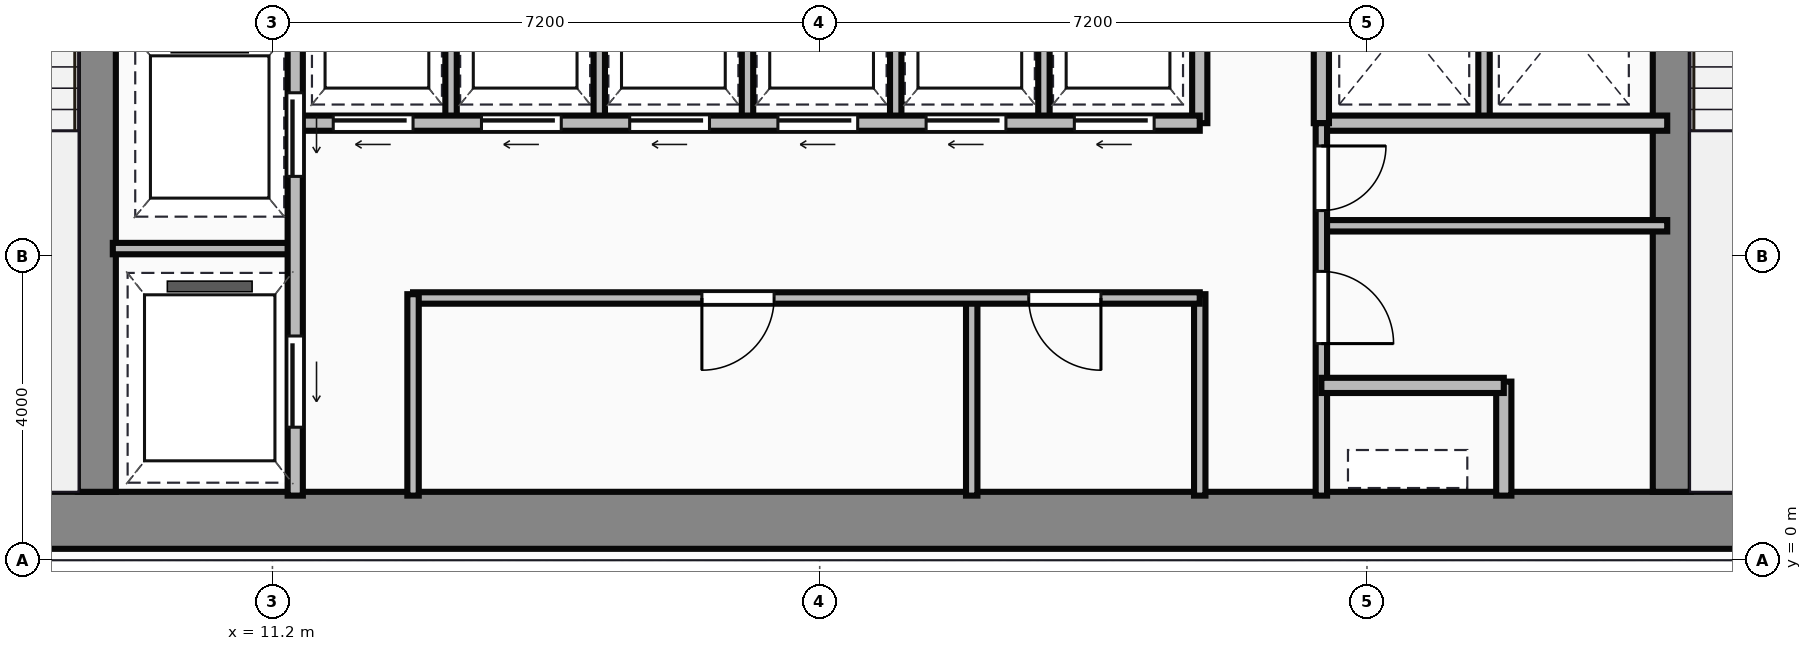
"""IFC4 building model, lengths in metres.
Left out: names, types, materials, properties, quantities, classifications, styles, units other than length and angle.
Written with IfcOpenShell. Run it as: python <this file> out.ifc"""

import sys

from ifc_helpers import new_model, si_unit, direction, frame, frame_2d, origin, place, context, subcontext, project, spatial, rectangle, extrude, source, transform, mapped, element, fill, save


model = new_model("IFC4")
c1 = context("Model", 3, precision=1e-05, world=origin(), true_north=direction((0.0, 1.0)))
c2 = subcontext(c1, "Body", "Model", "MODEL_VIEW")
j1 = project(units=[si_unit("LENGTHUNIT", "METRE"), si_unit("PLANEANGLEUNIT", "RADIAN")], contexts=[c1])
p1 = place(None, origin())
s1 = spatial("IfcSite", under=j1, at=p1, CompositionType="ELEMENT")
p2 = place(p1, origin())
s2 = spatial("IfcBuilding", under=s1, at=p2, CompositionType="ELEMENT")
p3 = place(p2, frame((0.0, 0.0, 92.3)))
s3 = spatial("IfcBuildingStorey", under=s2, at=p3, CompositionType="ELEMENT", Elevation=92.3)
m1 = source(origin(), c2, "Body", "SweptSolid", [
    extrude(rectangle(XDim=29.5, YDim=0.75, at=frame_2d((14.75, 0.0))), origin(), (0.0, 0.0, 1.0), 3.65),
])
p4 = place(p3, frame((4.5, 0.525, 0.0), z_axis=(0.0, 0.0, 1.0), x_axis=(1.0, 0.0, 0.0)))
e1 = element("IfcWall", 1, at=p4, inside=s3, PredefinedType="SHEAR", context=c2, shape_type="MappedRepresentation", body=[
    mapped(m1, transform((0.0, 0.0, 0.0))),
])
m2 = source(origin(), c2, "Body", "SweptSolid", [
    extrude(rectangle(XDim=12.35, YDim=0.5, at=frame_2d((6.175, 0.0))), origin(), (0.0, 0.0, 1.0), 3.65),
])
for number, where, z_axis, x_axis in (
    (2, (8.89, 0.9, 0.0), (0.0, 0.0, 1.0), (0.0, 1.0, 0.0)),
    (3, (29.61, 0.9, 0.0), (0.0, 0.0, 1.0), (0.0, 1.0, 0.0)),
):
    element("IfcWall", number, at=place(p3, frame(where, z_axis=z_axis, x_axis=x_axis)), inside=s3, PredefinedType="SHEAR", context=c2, shape_type="MappedRepresentation", body=[
        mapped(m2, transform((0.0, 0.0, 0.0))),
    ])
m3 = source(origin(), c2, "Body", "SweptSolid", [
    extrude(rectangle(XDim=9.6, YDim=0.2, at=frame_2d((4.8, 0.0))), origin(), (0.0, 0.0, 1.0), 3.4),
])
p5 = place(p3, frame((11.5, 0.85, 0.0), z_axis=(0.0, 0.0, 1.0), x_axis=(0.0, 1.0, 0.0)))
e4 = element("IfcWall", 4, at=p5, inside=s3, PredefinedType="PARTITIONING", context=c2, shape_type="MappedRepresentation", body=[
    mapped(m3, transform((0.0, 0.0, 0.0))),
])
p6 = place(p5, frame((4.2, 0.0, 0.0)))
e5 = element("IfcOpeningElement", 5, at=p6, cuts=e4, PredefinedType="OPENING", context=c2, shape_type="SweptSolid", body=[
    extrude(rectangle(XDim=1.1, YDim=2.15, at=frame_2d((0.55, 1.075))), frame((0.0, 0.11, 0.0), z_axis=(0.0, -1.0, 0.0), x_axis=(1.0, 0.0, 0.0)), (0.0, 0.0, 1.0), 0.22),
])
p7 = place(p5, frame((0.9, 0.0, 0.0)))
e6 = element("IfcOpeningElement", 6, at=p7, cuts=e4, PredefinedType="OPENING", context=c2, shape_type="SweptSolid", body=[
    extrude(rectangle(XDim=1.2, YDim=2.15, at=frame_2d((0.6, 1.075))), frame((0.0, 0.11, 0.0), z_axis=(0.0, -1.0, 0.0), x_axis=(1.0, 0.0, 0.0)), (0.0, 0.0, 1.0), 0.22),
])
m4 = source(origin(), c2, "Body", "SweptSolid", [
    extrude(rectangle(XDim=2.4, YDim=0.15, at=frame_2d((1.2, 0.0))), origin(), (0.0, 0.0, 1.0), 3.4),
])
p8 = place(p3, frame((9.1, 4.1, 0.0), z_axis=(0.0, 0.0, 1.0), x_axis=(1.0, 0.0, 0.0)))
e7 = element("IfcWall", 7, at=p8, inside=s3, PredefinedType="PARTITIONING", context=c2, shape_type="MappedRepresentation", body=[
    mapped(m4, transform((0.0, 0.0, 0.0))),
])
m5 = source(origin(), c2, "Body", "SweptSolid", [
    extrude(rectangle(XDim=2.65, YDim=0.15, at=frame_2d((1.325, 0.0))), origin(), (0.0, 0.0, 1.0), 3.4),
])
p9 = place(p3, frame((13.05, 0.85, 0.0), z_axis=(0.0, 0.0, 1.0), x_axis=(0.0, 1.0, 0.0)))
e8 = element("IfcWall", 8, at=p9, inside=s3, PredefinedType="PARTITIONING", context=c2, shape_type="MappedRepresentation", body=[
    mapped(m5, transform((0.0, 0.0, 0.0))),
])
m6 = source(origin(), c2, "Body", "SweptSolid", [
    extrude(rectangle(XDim=10.35, YDim=0.15, at=frame_2d((5.175, 0.0))), origin(), (0.0, 0.0, 1.0), 3.4),
])
p10 = place(p3, frame((13.05, 3.45, 0.0), z_axis=(0.0, 0.0, 1.0), x_axis=(1.0, 0.0, 0.0)))
e9 = element("IfcWall", 9, at=p10, inside=s3, PredefinedType="PARTITIONING", context=c2, shape_type="MappedRepresentation", body=[
    mapped(m6, transform((0.0, 0.0, 0.0))),
])
p11 = place(p10, frame((3.8, 0.0, 0.0)))
e10 = element("IfcOpeningElement", 10, at=p11, cuts=e9, PredefinedType="OPENING", context=c2, shape_type="SweptSolid", body=[
    extrude(rectangle(XDim=0.95, YDim=2.15, at=frame_2d((0.475, 1.075))), frame((0.0, 0.085, 0.0), z_axis=(0.0, -1.0, 0.0), x_axis=(1.0, 0.0, 0.0)), (0.0, 0.0, 1.0), 0.17),
])
p12 = place(p10, frame((8.1, 0.0, 0.0)))
e11 = element("IfcOpeningElement", 11, at=p12, cuts=e9, PredefinedType="OPENING", context=c2, shape_type="SweptSolid", body=[
    extrude(rectangle(XDim=0.95, YDim=2.15, at=frame_2d((0.475, 1.075))), frame((0.0, 0.085, 0.0), z_axis=(0.0, -1.0, 0.0), x_axis=(1.0, 0.0, 0.0)), (0.0, 0.0, 1.0), 0.17),
])
p13 = place(p3, frame((23.4, 0.85, 0.0), z_axis=(0.0, 0.0, 1.0), x_axis=(0.0, 1.0, 0.0)))
e12 = element("IfcWall", 12, at=p13, inside=s3, PredefinedType="PARTITIONING", context=c2, shape_type="MappedRepresentation", body=[
    mapped(m5, transform((0.0, 0.0, 0.0))),
])
m7 = source(origin(), c2, "Body", "SweptSolid", [
    extrude(rectangle(XDim=2.6, YDim=0.15, at=frame_2d((1.3, 0.0))), origin(), (0.0, 0.0, 1.0), 3.4),
])
p14 = place(p3, frame((20.4, 0.85, 0.0), z_axis=(0.0, 0.0, 1.0), x_axis=(0.0, 1.0, 0.0)))
e13 = element("IfcWall", 13, at=p14, inside=s3, PredefinedType="PARTITIONING", context=c2, shape_type="MappedRepresentation", body=[
    mapped(m7, transform((0.0, 0.0, 0.0))),
])
m8 = source(origin(), c2, "Body", "SweptSolid", [
    extrude(rectangle(XDim=11.85, YDim=0.2, at=frame_2d((5.925, 0.0))), origin(), (0.0, 0.0, 1.0), 3.4),
])
p15 = place(p3, frame((11.55, 5.75, 0.0), z_axis=(0.0, 0.0, 1.0), x_axis=(1.0, 0.0, 0.0)))
e14 = element("IfcWall", 14, at=p15, inside=s3, PredefinedType="PARTITIONING", context=c2, shape_type="MappedRepresentation", body=[
    mapped(m8, transform((0.0, 0.0, 0.0))),
])
p16 = place(p15, frame((0.45, 0.0, 0.0)))
e15 = element("IfcOpeningElement", 15, at=p16, cuts=e14, PredefinedType="OPENING", context=c2, shape_type="SweptSolid", body=[
    extrude(rectangle(XDim=1.05, YDim=2.15, at=frame_2d((0.525, 1.075))), frame((0.0, 0.11, 0.0), z_axis=(0.0, -1.0, 0.0), x_axis=(1.0, 0.0, 0.0)), (0.0, 0.0, 1.0), 0.22),
])
p17 = place(p15, frame((2.4, 0.0, 0.0)))
e16 = element("IfcOpeningElement", 16, at=p17, cuts=e14, PredefinedType="OPENING", context=c2, shape_type="SweptSolid", body=[
    extrude(rectangle(XDim=1.05, YDim=2.15, at=frame_2d((0.525, 1.075))), frame((0.0, 0.11, 0.0), z_axis=(0.0, -1.0, 0.0), x_axis=(1.0, 0.0, 0.0)), (0.0, 0.0, 1.0), 0.22),
])
p18 = place(p15, frame((4.35, 0.0, 0.0)))
e17 = element("IfcOpeningElement", 17, at=p18, cuts=e14, PredefinedType="OPENING", context=c2, shape_type="SweptSolid", body=[
    extrude(rectangle(XDim=1.05, YDim=2.15, at=frame_2d((0.525, 1.075))), frame((0.0, 0.11, 0.0), z_axis=(0.0, -1.0, 0.0), x_axis=(1.0, 0.0, 0.0)), (0.0, 0.0, 1.0), 0.22),
])
p19 = place(p15, frame((6.3, 0.0, 0.0)))
e18 = element("IfcOpeningElement", 18, at=p19, cuts=e14, PredefinedType="OPENING", context=c2, shape_type="SweptSolid", body=[
    extrude(rectangle(XDim=1.05, YDim=2.15, at=frame_2d((0.525, 1.075))), frame((0.0, 0.11, 0.0), z_axis=(0.0, -1.0, 0.0), x_axis=(1.0, 0.0, 0.0)), (0.0, 0.0, 1.0), 0.22),
])
p20 = place(p15, frame((8.25, 0.0, 0.0)))
e19 = element("IfcOpeningElement", 19, at=p20, cuts=e14, PredefinedType="OPENING", context=c2, shape_type="SweptSolid", body=[
    extrude(rectangle(XDim=1.05, YDim=2.15, at=frame_2d((0.525, 1.075))), frame((0.0, 0.11, 0.0), z_axis=(0.0, -1.0, 0.0), x_axis=(1.0, 0.0, 0.0)), (0.0, 0.0, 1.0), 0.22),
])
p21 = place(p15, frame((10.2, 0.0, 0.0)))
e20 = element("IfcOpeningElement", 20, at=p21, cuts=e14, PredefinedType="OPENING", context=c2, shape_type="SweptSolid", body=[
    extrude(rectangle(XDim=1.05, YDim=2.15, at=frame_2d((0.525, 1.075))), frame((0.0, 0.11, 0.0), z_axis=(0.0, -1.0, 0.0), x_axis=(1.0, 0.0, 0.0)), (0.0, 0.0, 1.0), 0.22),
])
m9 = source(origin(), c2, "Body", "SweptSolid", [
    extrude(rectangle(XDim=2.6, YDim=0.2, at=frame_2d((1.3, 0.0))), origin(), (0.0, 0.0, 1.0), 3.4),
])
p22 = place(p3, frame((23.4, 5.75, 0.0), z_axis=(0.0, 0.0, 1.0), x_axis=(0.0, 1.0, 0.0)))
e21 = element("IfcWall", 21, at=p22, inside=s3, PredefinedType="PARTITIONING", context=c2, shape_type="MappedRepresentation", body=[
    mapped(m9, transform((0.0, 0.0, 0.0))),
])
m10 = source(origin(), c2, "Body", "SweptSolid", [
    extrude(rectangle(XDim=2.5, YDim=0.15, at=frame_2d((1.25, 0.0))), origin(), (0.0, 0.0, 1.0), 3.4),
])
for number, where, z_axis, x_axis in (
    (22, (13.55, 5.8, 0.0), (0.0, 0.0, 1.0), (0.0, 1.0, 0.0)),
    (23, (15.5, 5.8, 0.0), (0.0, 0.0, 1.0), (0.0, 1.0, 0.0)),
    (24, (17.45, 5.8, 0.0), (0.0, 0.0, 1.0), (0.0, 1.0, 0.0)),
    (25, (19.4, 5.8, 0.0), (0.0, 0.0, 1.0), (0.0, 1.0, 0.0)),
    (26, (21.35, 5.8, 0.0), (0.0, 0.0, 1.0), (0.0, 1.0, 0.0)),
):
    element("IfcWall", number, at=place(p3, frame(where, z_axis=z_axis, x_axis=x_axis)), inside=s3, PredefinedType="PARTITIONING", context=c2, shape_type="MappedRepresentation", body=[
        mapped(m10, transform((0.0, 0.0, 0.0))),
    ])
m11 = source(origin(), c2, "Body", "SweptSolid", [
    extrude(rectangle(XDim=4.55, YDim=0.2, at=frame_2d((2.275, 0.0))), origin(), (0.0, 0.0, 1.0), 3.4),
])
p23 = place(p3, frame((25.0, 5.75, 0.0), z_axis=(0.0, 0.0, 1.0), x_axis=(1.0, 0.0, 0.0)))
e27 = element("IfcWall", 27, at=p23, inside=s3, PredefinedType="PARTITIONING", context=c2, shape_type="MappedRepresentation", body=[
    mapped(m11, transform((0.0, 0.0, 0.0))),
])
p24 = place(p3, frame((25.0, 5.75, 0.0), z_axis=(0.0, 0.0, 1.0), x_axis=(0.0, 1.0, 0.0)))
e28 = element("IfcWall", 28, at=p24, inside=s3, PredefinedType="PARTITIONING", context=c2, shape_type="MappedRepresentation", body=[
    mapped(m9, transform((0.0, 0.0, 0.0))),
])
p25 = place(p3, frame((27.14, 5.8, 0.0), z_axis=(0.0, 0.0, 1.0), x_axis=(0.0, 1.0, 0.0)))
e29 = element("IfcWall", 29, at=p25, inside=s3, PredefinedType="PARTITIONING", context=c2, shape_type="MappedRepresentation", body=[
    mapped(m10, transform((0.0, 0.0, 0.0))),
])
m12 = source(origin(), c2, "Body", "SweptSolid", [
    extrude(rectangle(XDim=4.9, YDim=0.15, at=frame_2d((2.45, 0.0))), origin(), (0.0, 0.0, 1.0), 3.4),
])
p26 = place(p3, frame((25.0, 0.85, 0.0), z_axis=(0.0, 0.0, 1.0), x_axis=(0.0, 1.0, 0.0)))
e30 = element("IfcWall", 30, at=p26, inside=s3, PredefinedType="PARTITIONING", context=c2, shape_type="MappedRepresentation", body=[
    mapped(m12, transform((0.0, 0.0, 0.0))),
])
p27 = place(p26, frame((2.0, 0.0, 0.0)))
e31 = element("IfcOpeningElement", 31, at=p27, cuts=e30, PredefinedType="OPENING", context=c2, shape_type="SweptSolid", body=[
    extrude(rectangle(XDim=0.95, YDim=2.15, at=frame_2d((0.475, 1.075))), frame((0.0, 0.085, 0.0), z_axis=(0.0, -1.0, 0.0), x_axis=(1.0, 0.0, 0.0)), (0.0, 0.0, 1.0), 0.17),
])
p28 = place(p26, frame((3.75, 0.0, 0.0)))
e32 = element("IfcOpeningElement", 32, at=p28, cuts=e30, PredefinedType="OPENING", context=c2, shape_type="SweptSolid", body=[
    extrude(rectangle(XDim=0.85, YDim=2.15, at=frame_2d((0.425, 1.075))), frame((0.0, 0.085, 0.0), z_axis=(0.0, -1.0, 0.0), x_axis=(1.0, 0.0, 0.0)), (0.0, 0.0, 1.0), 0.17),
])
m13 = source(origin(), c2, "Body", "SweptSolid", [
    extrude(rectangle(XDim=2.4, YDim=0.2, at=frame_2d((1.2, 0.0))), origin(), (0.0, 0.0, 1.0), 3.4),
])
p29 = place(p3, frame((25.0, 2.3, 0.0), z_axis=(0.0, 0.0, 1.0), x_axis=(1.0, 0.0, 0.0)))
e33 = element("IfcWall", 33, at=p29, inside=s3, PredefinedType="PARTITIONING", context=c2, shape_type="MappedRepresentation", body=[
    mapped(m13, transform((0.0, 0.0, 0.0))),
])
m14 = source(origin(), c2, "Body", "SweptSolid", [
    extrude(rectangle(XDim=1.5, YDim=0.2, at=frame_2d((0.75, 0.0))), origin(), (0.0, 0.0, 1.0), 3.4),
])
p30 = place(p3, frame((27.4, 0.85, 0.0), z_axis=(0.0, 0.0, 1.0), x_axis=(0.0, 1.0, 0.0)))
e34 = element("IfcWall", 34, at=p30, inside=s3, PredefinedType="PARTITIONING", context=c2, shape_type="MappedRepresentation", body=[
    mapped(m14, transform((0.0, 0.0, 0.0))),
])
m15 = source(origin(), c2, "Body", "SweptSolid", [
    extrude(rectangle(XDim=4.55, YDim=0.15, at=frame_2d((2.275, 0.0))), origin(), (0.0, 0.0, 1.0), 3.4),
])
p31 = place(p3, frame((25.0, 4.4, 0.0), z_axis=(0.0, 0.0, 1.0), x_axis=(1.0, 0.0, 0.0)))
e35 = element("IfcWall", 35, at=p31, inside=s3, PredefinedType="PARTITIONING", context=c2, shape_type="MappedRepresentation", body=[
    mapped(m15, transform((0.0, 0.0, 0.0))),
])
m16 = source(origin(), c2, "Body", "SweptSolid", [
    extrude(rectangle(XDim=1.1, YDim=2.15, at=frame_2d((0.55, 1.075))), frame((0.0, 0.025, 0.0), z_axis=(0.0, -1.0, 0.0), x_axis=(1.0, 0.0, 0.0)), (0.0, 0.0, 1.0), 0.05),
])
p32 = place(p6, frame((1.1, 0.0, 0.0), z_axis=(0.0, 0.0, 1.0), x_axis=(-1.0, 0.0, 0.0)))
e36 = element("IfcDoor", 36, at=p32, inside=s3, OperationType="SLIDING_TO_LEFT", PredefinedType="DOOR", context=c2, shape_type="MappedRepresentation", body=[
    mapped(m16, transform((0.0, 0.0, 0.0))),
])
fill(e5, e36)
m17 = source(origin(), c2, "Body", "SweptSolid", [
    extrude(rectangle(XDim=1.2, YDim=2.15, at=frame_2d((0.6, 1.075))), frame((0.0, 0.025, 0.0), z_axis=(0.0, -1.0, 0.0), x_axis=(1.0, 0.0, 0.0)), (0.0, 0.0, 1.0), 0.05),
])
p33 = place(p7, frame((1.2, 0.0, 0.0), z_axis=(0.0, 0.0, 1.0), x_axis=(-1.0, 0.0, 0.0)))
e37 = element("IfcDoor", 37, at=p33, inside=s3, OperationType="SLIDING_TO_LEFT", PredefinedType="DOOR", context=c2, shape_type="MappedRepresentation", body=[
    mapped(m17, transform((0.0, 0.0, 0.0))),
])
fill(e6, e37)
m18 = source(origin(), c2, "Body", "SweptSolid", [
    extrude(rectangle(XDim=0.95, YDim=2.15, at=frame_2d((0.475, 1.075))), frame((0.0, 0.025, 0.0), z_axis=(0.0, -1.0, 0.0), x_axis=(1.0, 0.0, 0.0)), (0.0, 0.0, 1.0), 0.05),
])
p34 = place(p11, origin())
e38 = element("IfcDoor", 38, at=p34, inside=s3, OperationType="SINGLE_SWING_LEFT", PredefinedType="DOOR", context=c2, shape_type="MappedRepresentation", body=[
    mapped(m18, transform((0.0, 0.0, 0.0))),
])
fill(e10, e38)
p35 = place(p12, origin())
e39 = element("IfcDoor", 39, at=p35, inside=s3, OperationType="SINGLE_SWING_RIGHT", PredefinedType="DOOR", context=c2, shape_type="MappedRepresentation", body=[
    mapped(m18, transform((0.0, 0.0, 0.0))),
])
fill(e11, e39)
m19 = source(origin(), c2, "Body", "SweptSolid", [
    extrude(rectangle(XDim=1.05, YDim=2.15, at=frame_2d((0.525, 1.075))), frame((0.0, 0.025, 0.0), z_axis=(0.0, -1.0, 0.0), x_axis=(1.0, 0.0, 0.0)), (0.0, 0.0, 1.0), 0.05),
])
p36 = place(p16, frame((1.05, 0.0, 0.0), z_axis=(0.0, 0.0, 1.0), x_axis=(-1.0, 0.0, 0.0)))
e40 = element("IfcDoor", 40, at=p36, inside=s3, OperationType="SLIDING_TO_LEFT", PredefinedType="DOOR", context=c2, shape_type="MappedRepresentation", body=[
    mapped(m19, transform((0.0, 0.0, 0.0))),
])
fill(e15, e40)
p37 = place(p17, frame((1.05, 0.0, 0.0), z_axis=(0.0, 0.0, 1.0), x_axis=(-1.0, 0.0, 0.0)))
e41 = element("IfcDoor", 41, at=p37, inside=s3, OperationType="SLIDING_TO_LEFT", PredefinedType="DOOR", context=c2, shape_type="MappedRepresentation", body=[
    mapped(m19, transform((0.0, 0.0, 0.0))),
])
fill(e16, e41)
p38 = place(p18, frame((1.05, 0.0, 0.0), z_axis=(0.0, 0.0, 1.0), x_axis=(-1.0, 0.0, 0.0)))
e42 = element("IfcDoor", 42, at=p38, inside=s3, OperationType="SLIDING_TO_LEFT", PredefinedType="DOOR", context=c2, shape_type="MappedRepresentation", body=[
    mapped(m19, transform((0.0, 0.0, 0.0))),
])
fill(e17, e42)
p39 = place(p19, frame((1.05, 0.0, 0.0), z_axis=(0.0, 0.0, 1.0), x_axis=(-1.0, 0.0, 0.0)))
e43 = element("IfcDoor", 43, at=p39, inside=s3, OperationType="SLIDING_TO_LEFT", PredefinedType="DOOR", context=c2, shape_type="MappedRepresentation", body=[
    mapped(m19, transform((0.0, 0.0, 0.0))),
])
fill(e18, e43)
p40 = place(p20, frame((1.05, 0.0, 0.0), z_axis=(0.0, 0.0, 1.0), x_axis=(-1.0, 0.0, 0.0)))
e44 = element("IfcDoor", 44, at=p40, inside=s3, OperationType="SLIDING_TO_LEFT", PredefinedType="DOOR", context=c2, shape_type="MappedRepresentation", body=[
    mapped(m19, transform((0.0, 0.0, 0.0))),
])
fill(e19, e44)
p41 = place(p21, frame((1.05, 0.0, 0.0), z_axis=(0.0, 0.0, 1.0), x_axis=(-1.0, 0.0, 0.0)))
e45 = element("IfcDoor", 45, at=p41, inside=s3, OperationType="SLIDING_TO_LEFT", PredefinedType="DOOR", context=c2, shape_type="MappedRepresentation", body=[
    mapped(m19, transform((0.0, 0.0, 0.0))),
])
fill(e20, e45)
p42 = place(p27, origin())
e46 = element("IfcDoor", 46, at=p42, inside=s3, OperationType="SINGLE_SWING_LEFT", PredefinedType="DOOR", context=c2, shape_type="MappedRepresentation", body=[
    mapped(m18, transform((0.0, 0.0, 0.0))),
])
fill(e31, e46)
m20 = source(origin(), c2, "Body", "SweptSolid", [
    extrude(rectangle(XDim=0.85, YDim=2.15, at=frame_2d((0.425, 1.075))), frame((0.0, 0.025, 0.0), z_axis=(0.0, -1.0, 0.0), x_axis=(1.0, 0.0, 0.0)), (0.0, 0.0, 1.0), 0.05),
])
p43 = place(p28, origin())
e47 = element("IfcDoor", 47, at=p43, inside=s3, OperationType="SINGLE_SWING_RIGHT", PredefinedType="DOOR", context=c2, shape_type="MappedRepresentation", body=[
    mapped(m20, transform((0.0, 0.0, 0.0))),
])
fill(e32, e47)
save(model, sys.argv[1])
